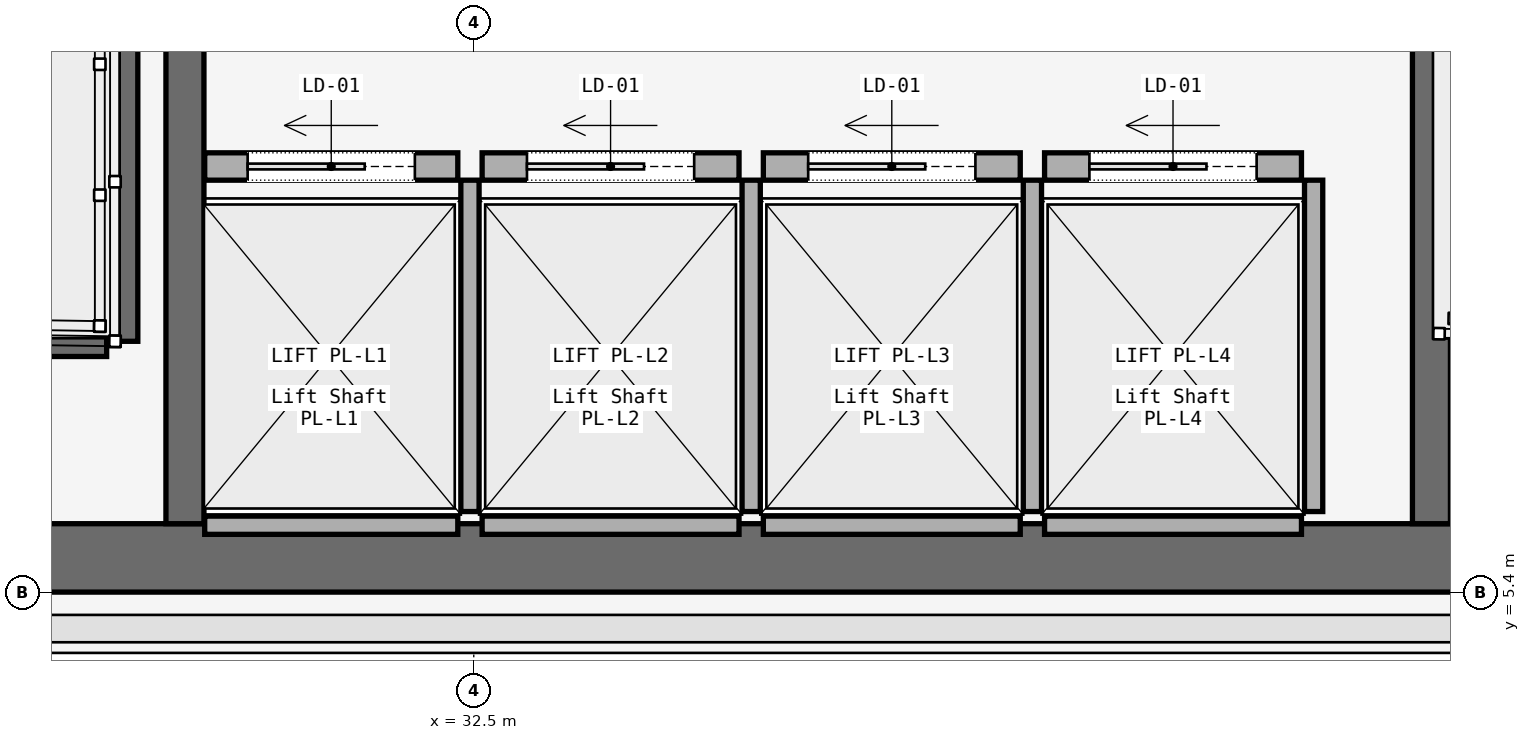
"""IFC4 building model, lengths in metres.
Left out: names, types, materials, properties, quantities, classifications, styles, units other than length and angle.
Written with IfcOpenShell. Run it as: python <this file> out.ifc"""

import sys

from ifc_helpers import new_model, si_unit, direction, frame, frame_2d, origin, place, context, subcontext, project, spatial, rectangle, extrude, element, fill, save


model = new_model("IFC4")
c1 = context("Model", 3, precision=1e-05, world=origin(), true_north=direction((0.0, 1.0)))
c2 = subcontext(c1, "Body", "Model", "MODEL_VIEW")
j1 = project(units=[si_unit("LENGTHUNIT", "METRE"), si_unit("PLANEANGLEUNIT", "RADIAN")], contexts=[c1])
p1 = place(None, origin())
s1 = spatial("IfcSite", under=j1, at=p1, CompositionType="ELEMENT")
p2 = place(p1, origin())
s2 = spatial("IfcBuilding", under=s1, at=p2, CompositionType="ELEMENT")
p3 = place(p2, frame((0.0, 0.0, 47.4)))
s3 = spatial("IfcBuildingStorey", under=s2, at=p3, CompositionType="ELEMENT", Elevation=47.4)
p4 = place(p3, frame((26.45, 5.625, 0.0), z_axis=(0.0, 0.0, 1.0), x_axis=(1.0, 0.0, 0.0)))
e1 = element("IfcWall", 1, at=p4, inside=s3, PredefinedType="SOLIDWALL", context=c2, shape_type="SweptSolid", body=[
    extrude(rectangle(XDim=31.1, YDim=0.45, at=frame_2d((15.55, 0.0))), origin(), (0.0, 0.0, 1.0), 3.58),
])
for number, where, z_axis, x_axis in (
    (2, (30.6, 5.85, 0.0), (0.0, 0.0, 1.0), (0.0, 1.0, 0.0)),
    (3, (38.8, 5.85, 0.0), (0.0, 0.0, 1.0), (0.0, 1.0, 0.0)),
):
    element("IfcWall", number, at=place(p3, frame(where, z_axis=z_axis, x_axis=x_axis)), inside=s3, PredefinedType="SOLIDWALL", context=c2, shape_type="SweptSolid", body=[
        extrude(rectangle(XDim=8.9, YDim=0.25, at=frame_2d((4.45, 0.0))), origin(), (0.0, 0.0, 1.0), 3.58),
    ])
p5 = place(p3, frame((30.19, 14.7, 0.0), z_axis=(0.0, 0.0, 1.0), x_axis=(0.0, -1.0, 0.0)))
e4 = element("IfcWall", 4, at=p5, inside=s3, PredefinedType="SOLIDWALL", context=c2, shape_type="SweptSolid", body=[
    extrude(rectangle(XDim=7.65, YDim=0.2, at=frame_2d((3.825, 0.0))), origin(), (0.0, 0.0, 1.0), 3.8),
])
p6 = place(p3, frame((26.97, 7.05, 0.0), z_axis=(0.0, 0.0, 1.0), x_axis=(1.0, 0.0, 0.0)))
e5 = element("IfcWall", 5, at=p6, inside=s3, PredefinedType="SOLIDWALL", context=c2, shape_type="SweptSolid", body=[
    extrude(rectangle(XDim=3.115, YDim=0.2, at=frame_2d((1.558, 0.0))), origin(), (0.0, 0.0, 1.0), 3.8),
])
p7 = place(p3, frame((30.73, 8.2, 0.0), z_axis=(0.0, 0.0, 1.0), x_axis=(1.0, 0.0, 0.0)))
e6 = element("IfcWall", 6, at=p7, inside=s3, PredefinedType="SOLIDWALL", context=c2, shape_type="SweptSolid", body=[
    extrude(rectangle(XDim=1.665, YDim=0.18, at=frame_2d((0.833, 0.0))), origin(), (0.0, 0.0, 1.0), 2.933),
])
p8 = place(p7, frame((0.282, 0.0, 0.0)))
e7 = element("IfcOpeningElement", 7, at=p8, cuts=e6, PredefinedType="OPENING", context=c2, shape_type="SweptSolid", body=[
    extrude(rectangle(XDim=1.1, YDim=2.2, at=frame_2d((0.55, 1.1))), frame((0.0, 0.09, 0.0), z_axis=(0.0, -1.0, 0.0), x_axis=(1.0, 0.0, 0.0)), (0.0, 0.0, 1.0), 0.18),
])
p9 = place(p3, frame((30.73, 5.84, 0.0), z_axis=(0.0, 0.0, 1.0), x_axis=(1.0, 0.0, 0.0)))
e8 = element("IfcWall", 8, at=p9, inside=s3, PredefinedType="SOLIDWALL", context=c2, shape_type="SweptSolid", body=[
    extrude(rectangle(XDim=1.665, YDim=0.12, at=frame_2d((0.833, 0.0))), origin(), (0.0, 0.0, 1.0), 2.933),
])
p10 = place(p3, frame((32.475, 5.93, 0.0), z_axis=(0.0, 0.0, 1.0), x_axis=(0.0, 1.0, 0.0)))
e9 = element("IfcWall", 9, at=p10, inside=s3, PredefinedType="SOLIDWALL", context=c2, shape_type="SweptSolid", body=[
    extrude(rectangle(XDim=2.18, YDim=0.12, at=frame_2d((1.09, 0.0))), origin(), (0.0, 0.0, 1.0), 2.933),
])
p11 = place(p3, frame((32.555, 8.2, 0.0), z_axis=(0.0, 0.0, 1.0), x_axis=(1.0, 0.0, 0.0)))
e10 = element("IfcWall", 10, at=p11, inside=s3, PredefinedType="SOLIDWALL", context=c2, shape_type="SweptSolid", body=[
    extrude(rectangle(XDim=1.69, YDim=0.18, at=frame_2d((0.845, 0.0))), origin(), (0.0, 0.0, 1.0), 2.933),
])
p12 = place(p11, frame((0.295, 0.0, 0.0)))
e11 = element("IfcOpeningElement", 11, at=p12, cuts=e10, PredefinedType="OPENING", context=c2, shape_type="SweptSolid", body=[
    extrude(rectangle(XDim=1.1, YDim=2.2, at=frame_2d((0.55, 1.1))), frame((0.0, 0.09, 0.0), z_axis=(0.0, -1.0, 0.0), x_axis=(1.0, 0.0, 0.0)), (0.0, 0.0, 1.0), 0.18),
])
p13 = place(p3, frame((32.555, 5.84, 0.0), z_axis=(0.0, 0.0, 1.0), x_axis=(1.0, 0.0, 0.0)))
e12 = element("IfcWall", 12, at=p13, inside=s3, PredefinedType="SOLIDWALL", context=c2, shape_type="SweptSolid", body=[
    extrude(rectangle(XDim=1.69, YDim=0.12, at=frame_2d((0.845, 0.0))), origin(), (0.0, 0.0, 1.0), 2.933),
])
p14 = place(p3, frame((34.325, 5.93, 0.0), z_axis=(0.0, 0.0, 1.0), x_axis=(0.0, 1.0, 0.0)))
e13 = element("IfcWall", 13, at=p14, inside=s3, PredefinedType="SOLIDWALL", context=c2, shape_type="SweptSolid", body=[
    extrude(rectangle(XDim=2.18, YDim=0.12, at=frame_2d((1.09, 0.0))), origin(), (0.0, 0.0, 1.0), 2.933),
])
p15 = place(p3, frame((34.405, 8.2, 0.0), z_axis=(0.0, 0.0, 1.0), x_axis=(1.0, 0.0, 0.0)))
e14 = element("IfcWall", 14, at=p15, inside=s3, PredefinedType="SOLIDWALL", context=c2, shape_type="SweptSolid", body=[
    extrude(rectangle(XDim=1.69, YDim=0.18, at=frame_2d((0.845, 0.0))), origin(), (0.0, 0.0, 1.0), 2.933),
])
p16 = place(p15, frame((0.295, 0.0, 0.0)))
e15 = element("IfcOpeningElement", 15, at=p16, cuts=e14, PredefinedType="OPENING", context=c2, shape_type="SweptSolid", body=[
    extrude(rectangle(XDim=1.1, YDim=2.2, at=frame_2d((0.55, 1.1))), frame((0.0, 0.09, 0.0), z_axis=(0.0, -1.0, 0.0), x_axis=(1.0, 0.0, 0.0)), (0.0, 0.0, 1.0), 0.18),
])
p17 = place(p3, frame((34.405, 5.84, 0.0), z_axis=(0.0, 0.0, 1.0), x_axis=(1.0, 0.0, 0.0)))
e16 = element("IfcWall", 16, at=p17, inside=s3, PredefinedType="SOLIDWALL", context=c2, shape_type="SweptSolid", body=[
    extrude(rectangle(XDim=1.69, YDim=0.12, at=frame_2d((0.845, 0.0))), origin(), (0.0, 0.0, 1.0), 2.933),
])
p18 = place(p3, frame((36.175, 5.93, 0.0), z_axis=(0.0, 0.0, 1.0), x_axis=(0.0, 1.0, 0.0)))
e17 = element("IfcWall", 17, at=p18, inside=s3, PredefinedType="SOLIDWALL", context=c2, shape_type="SweptSolid", body=[
    extrude(rectangle(XDim=2.18, YDim=0.12, at=frame_2d((1.09, 0.0))), origin(), (0.0, 0.0, 1.0), 2.933),
])
p19 = place(p3, frame((36.255, 8.2, 0.0), z_axis=(0.0, 0.0, 1.0), x_axis=(1.0, 0.0, 0.0)))
e18 = element("IfcWall", 18, at=p19, inside=s3, PredefinedType="SOLIDWALL", context=c2, shape_type="SweptSolid", body=[
    extrude(rectangle(XDim=1.69, YDim=0.18, at=frame_2d((0.845, 0.0))), origin(), (0.0, 0.0, 1.0), 2.933),
])
p20 = place(p19, frame((0.295, 0.0, 0.0)))
e19 = element("IfcOpeningElement", 19, at=p20, cuts=e18, PredefinedType="OPENING", context=c2, shape_type="SweptSolid", body=[
    extrude(rectangle(XDim=1.1, YDim=2.2, at=frame_2d((0.55, 1.1))), frame((0.0, 0.09, 0.0), z_axis=(0.0, -1.0, 0.0), x_axis=(1.0, 0.0, 0.0)), (0.0, 0.0, 1.0), 0.18),
])
p21 = place(p3, frame((36.255, 5.84, 0.0), z_axis=(0.0, 0.0, 1.0), x_axis=(1.0, 0.0, 0.0)))
e20 = element("IfcWall", 20, at=p21, inside=s3, PredefinedType="SOLIDWALL", context=c2, shape_type="SweptSolid", body=[
    extrude(rectangle(XDim=1.69, YDim=0.12, at=frame_2d((0.845, 0.0))), origin(), (0.0, 0.0, 1.0), 2.933),
])
p22 = place(p3, frame((38.025, 5.93, 0.0), z_axis=(0.0, 0.0, 1.0), x_axis=(0.0, 1.0, 0.0)))
e21 = element("IfcWall", 21, at=p22, inside=s3, PredefinedType="SOLIDWALL", context=c2, shape_type="SweptSolid", body=[
    extrude(rectangle(XDim=2.18, YDim=0.12, at=frame_2d((1.09, 0.0))), origin(), (0.0, 0.0, 1.0), 2.933),
])
p23 = place(p8, origin())
e22 = element("IfcDoor", 22, at=p23, inside=s3, OperationType="SLIDING_TO_LEFT", PredefinedType="DOOR", context=c2, shape_type="SweptSolid", body=[
    extrude(rectangle(XDim=1.1, YDim=2.2, at=frame_2d((0.55, 1.1))), frame((0.0, 0.025, 0.0), z_axis=(0.0, -1.0, 0.0), x_axis=(1.0, 0.0, 0.0)), (0.0, 0.0, 1.0), 0.05),
])
fill(e7, e22)
p24 = place(p12, origin())
e23 = element("IfcDoor", 23, at=p24, inside=s3, OperationType="SLIDING_TO_LEFT", PredefinedType="DOOR", context=c2, shape_type="SweptSolid", body=[
    extrude(rectangle(XDim=1.1, YDim=2.2, at=frame_2d((0.55, 1.1))), frame((0.0, 0.025, 0.0), z_axis=(0.0, -1.0, 0.0), x_axis=(1.0, 0.0, 0.0)), (0.0, 0.0, 1.0), 0.05),
])
fill(e11, e23)
p25 = place(p16, origin())
e24 = element("IfcDoor", 24, at=p25, inside=s3, OperationType="SLIDING_TO_LEFT", PredefinedType="DOOR", context=c2, shape_type="SweptSolid", body=[
    extrude(rectangle(XDim=1.1, YDim=2.2, at=frame_2d((0.55, 1.1))), frame((0.0, 0.025, 0.0), z_axis=(0.0, -1.0, 0.0), x_axis=(1.0, 0.0, 0.0)), (0.0, 0.0, 1.0), 0.05),
])
fill(e15, e24)
p26 = place(p20, origin())
e25 = element("IfcDoor", 25, at=p26, inside=s3, OperationType="SLIDING_TO_LEFT", PredefinedType="DOOR", context=c2, shape_type="SweptSolid", body=[
    extrude(rectangle(XDim=1.1, YDim=2.2, at=frame_2d((0.55, 1.1))), frame((0.0, 0.025, 0.0), z_axis=(0.0, -1.0, 0.0), x_axis=(1.0, 0.0, 0.0)), (0.0, 0.0, 1.0), 0.05),
])
fill(e19, e25)
save(model, sys.argv[1])
